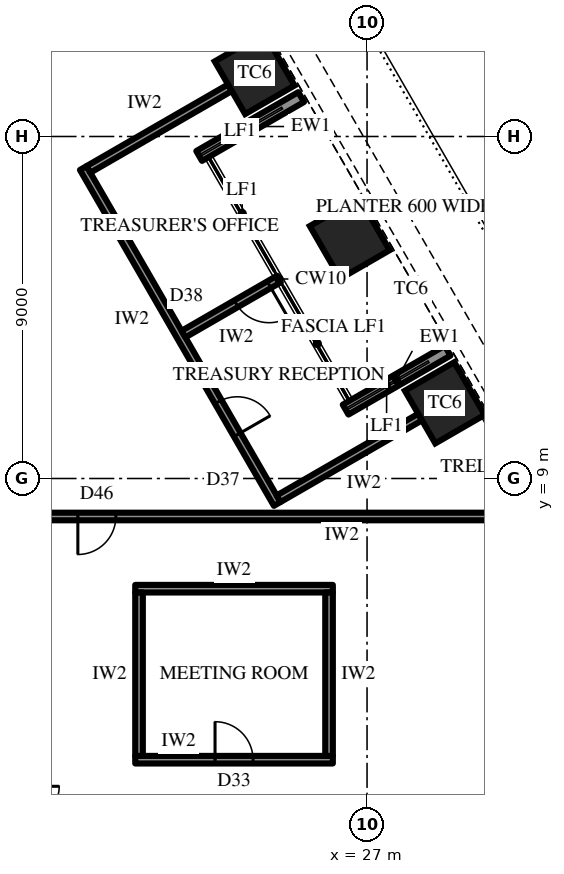
"""IFC4 building model, lengths in metres.
Left out: names, types, materials, properties, quantities, classifications, styles, units other than length and angle.
Written with IfcOpenShell. Run it as: python <this file> out.ifc"""

import sys

from ifc_helpers import new_model, si_unit, direction, frame, frame_2d, origin, origin_2d, place, context, subcontext, project, spatial, rectangle, extrude, element, fill, save


model = new_model("IFC4")
c1 = context("Model", 3, precision=1e-05, world=origin(), true_north=direction((0.0, 1.0)))
c2 = subcontext(c1, "Body", "Model", "MODEL_VIEW")
j1 = project(units=[si_unit("LENGTHUNIT", "METRE"), si_unit("PLANEANGLEUNIT", "RADIAN")], contexts=[c1])
p1 = place(None, origin())
s1 = spatial("IfcSite", under=j1, at=p1, CompositionType="ELEMENT")
p2 = place(p1, origin())
s2 = spatial("IfcBuilding", under=s1, at=p2, CompositionType="ELEMENT")
p3 = place(p2, frame((0.0, 0.0, 144.7)))
s3 = spatial("IfcBuildingStorey", under=s2, at=p3, CompositionType="ELEMENT", Elevation=144.7)
for number, where, z_axis, x_axis in (
    (1, (29.045, 10.992, 0.0), (0.0, 0.0, 1.0), (-0.5, 0.866, 0.0)),
    (2, (26.544, 15.325, 0.0), (0.0, 0.0, 1.0), (-0.5, 0.866, 0.0)),
    (3, (24.042, 19.658, 0.0), (0.0, 0.0, 1.0), (-0.5, 0.866, 0.0)),
):
    element("IfcColumn", number, at=place(p3, frame(where, z_axis=z_axis, x_axis=x_axis)), inside=s3, PredefinedType="COLUMN", context=c2, shape_type="SweptSolid", body=[
        extrude(rectangle(XDim=1.6, YDim=1.5, at=origin_2d()), origin(), (0.0, 0.0, 1.0), 4.2),
    ])
p4 = place(p3, frame((29.12, 12.363, 0.0), z_axis=(0.0, 0.0, 1.0), x_axis=(-0.86602952684, -0.49999285859, 0.0)))
e4 = element("IfcWall", 4, at=p4, inside=s3, PredefinedType="SOLIDWALL", context=c2, shape_type="SweptSolid", body=[
    extrude(rectangle(XDim=3.1, YDim=0.3, at=frame_2d((1.55, 0.0))), origin(), (0.0, 0.0, 1.0), 2.75),
])
p5 = place(p3, frame((25.266, 19.037, 0.0), z_axis=(0.0, 0.0, 1.0), x_axis=(-0.86600983753, -0.500026960575, 0.0)))
e5 = element("IfcWall", 5, at=p5, inside=s3, PredefinedType="SOLIDWALL", context=c2, shape_type="SweptSolid", body=[
    extrude(rectangle(XDim=3.1, YDim=0.3, at=frame_2d((1.55, 0.0))), origin(), (0.0, 0.0, 1.0), 2.75),
])
p6 = place(p3, frame((24.635, 8.33, 0.0), z_axis=(0.0, 0.0, 1.0), x_axis=(-0.500005407604, 0.86602228168, 0.0)))
e6 = element("IfcWall", 6, at=p6, inside=s3, PredefinedType="PARTITIONING", context=c2, shape_type="SweptSolid", body=[
    extrude(rectangle(XDim=10.208, YDim=0.2, at=frame_2d((5.104, 0.0))), origin(), (0.0, 0.0, 1.0), 4.0),
])
p7 = place(p6, frame((2.102, 0.0, 0.0)))
e7 = element("IfcOpeningElement", 7, at=p7, cuts=e6, PredefinedType="OPENING", context=c2, shape_type="SweptSolid", body=[
    extrude(rectangle(XDim=1.0, YDim=2.2, at=frame_2d((0.5, 1.1))), frame((0.0, 0.11, 0.0), z_axis=(0.0, -1.0, 0.0), x_axis=(1.0, 0.0, 0.0)), (0.0, 0.0, 1.0), 0.22),
])
p8 = place(p3, frame((24.672, 8.467, 0.0), z_axis=(0.0, 0.0, 1.0), x_axis=(0.866008775485, 0.500028799954, 0.0)))
e8 = element("IfcWall", 8, at=p8, inside=s3, PredefinedType="PARTITIONING", context=c2, shape_type="SweptSolid", body=[
    extrude(rectangle(XDim=4.3, YDim=0.2, at=frame_2d((2.15, 0.0))), origin(), (0.0, 0.0, 1.0), 3.082),
])
p9 = place(p3, frame((22.17, 12.8, 0.0), z_axis=(0.0, 0.0, 1.0), x_axis=(0.866044046824, 0.499967707918, 0.0)))
e9 = element("IfcWall", 9, at=p9, inside=s3, PredefinedType="PARTITIONING", context=c2, shape_type="SweptSolid", body=[
    extrude(rectangle(XDim=2.901, YDim=0.2, at=frame_2d((1.451, 0.0))), origin(), (0.0, 0.0, 1.0), 4.0),
])
p10 = place(p9, frame((1.6, 0.0, 0.0)))
e10 = element("IfcOpeningElement", 10, at=p10, cuts=e9, PredefinedType="OPENING", context=c2, shape_type="SweptSolid", body=[
    extrude(rectangle(XDim=1.0, YDim=2.2, at=frame_2d((0.5, 1.1))), frame((0.0, 0.11, 0.0), z_axis=(0.0, -1.0, 0.0), x_axis=(1.0, 0.0, 0.0)), (0.0, 0.0, 1.0), 0.22),
])
p11 = place(p3, frame((19.668, 17.133, 0.0), z_axis=(0.0, 0.0, 1.0), x_axis=(0.866008775485, 0.500028799954, 0.0)))
e11 = element("IfcWall", 11, at=p11, inside=s3, PredefinedType="PARTITIONING", context=c2, shape_type="SweptSolid", body=[
    extrude(rectangle(XDim=4.3, YDim=0.2, at=frame_2d((2.15, 0.0))), origin(), (0.0, 0.0, 1.0), 3.082),
])
p12 = place(p3, frame((20.9, 1.6, 0.0), z_axis=(0.0, 0.0, 1.0), x_axis=(1.0, 0.0, 0.0)))
e12 = element("IfcWall", 12, at=p12, inside=s3, PredefinedType="PARTITIONING", context=c2, shape_type="SweptSolid", body=[
    extrude(rectangle(XDim=5.2, YDim=0.2, at=frame_2d((2.6, 0.0))), origin(), (0.0, 0.0, 1.0), 4.0),
])
p13 = place(p12, frame((2.1, 0.0, 0.0)))
e13 = element("IfcOpeningElement", 13, at=p13, cuts=e12, PredefinedType="OPENING", context=c2, shape_type="SweptSolid", body=[
    extrude(rectangle(XDim=1.0, YDim=2.2, at=frame_2d((0.5, 1.1))), frame((0.0, 0.11, 0.0), z_axis=(0.0, -1.0, 0.0), x_axis=(1.0, 0.0, 0.0)), (0.0, 0.0, 1.0), 0.22),
])
p14 = place(p3, frame((20.9, 6.1, 0.0), z_axis=(0.0, 0.0, 1.0), x_axis=(1.0, 0.0, 0.0)))
e14 = element("IfcWall", 14, at=p14, inside=s3, PredefinedType="PARTITIONING", context=c2, shape_type="SweptSolid", body=[
    extrude(rectangle(XDim=5.2, YDim=0.2, at=frame_2d((2.6, 0.0))), origin(), (0.0, 0.0, 1.0), 4.0),
])
for number, where, z_axis, x_axis in (
    (15, (21.0, 1.7, 0.0), (0.0, 0.0, 1.0), (0.0, 1.0, 0.0)),
    (16, (26.0, 1.7, 0.0), (0.0, 0.0, 1.0), (0.0, 1.0, 0.0)),
):
    element("IfcWall", number, at=place(p3, frame(where, z_axis=z_axis, x_axis=x_axis)), inside=s3, PredefinedType="PARTITIONING", context=c2, shape_type="SweptSolid", body=[
        extrude(rectangle(XDim=4.3, YDim=0.2, at=frame_2d((2.15, 0.0))), origin(), (0.0, 0.0, 1.0), 4.0),
    ])
p15 = place(p3, frame((18.6, 8.0, 0.0), z_axis=(0.0, 0.0, 1.0), x_axis=(1.0, 0.0, 0.0)))
e17 = element("IfcWall", 17, at=p15, inside=s3, PredefinedType="PARTITIONING", context=c2, shape_type="SweptSolid", body=[
    extrude(rectangle(XDim=12.9, YDim=0.2, at=frame_2d((6.45, 0.0))), origin(), (0.0, 0.0, 1.0), 4.0),
])
p16 = place(p15, frame((0.79, 0.0, 0.0)))
e18 = element("IfcOpeningElement", 18, at=p16, cuts=e17, PredefinedType="OPENING", context=c2, shape_type="SweptSolid", body=[
    extrude(rectangle(XDim=1.0, YDim=2.2, at=frame_2d((0.5, 1.1))), frame((0.0, 0.11, 0.0), z_axis=(0.0, -1.0, 0.0), x_axis=(1.0, 0.0, 0.0)), (0.0, 0.0, 1.0), 0.22),
])
p17 = place(p7, frame((1.0, 0.0, 0.0), z_axis=(0.0, 0.0, 1.0), x_axis=(-1.0, 0.0, 0.0)))
e19 = element("IfcDoor", 19, at=p17, inside=s3, OperationType="SINGLE_SWING_LEFT", PredefinedType="DOOR", context=c2, shape_type="SweptSolid", body=[
    extrude(rectangle(XDim=1.0, YDim=2.2, at=frame_2d((0.5, 1.1))), frame((0.0, 0.025, 0.0), z_axis=(0.0, -1.0, 0.0), x_axis=(1.0, 0.0, 0.0)), (0.0, 0.0, 1.0), 0.05),
])
fill(e7, e19)
p18 = place(p10, frame((1.0, 0.0, 0.0), z_axis=(0.0, 0.0, 1.0), x_axis=(-1.0, 0.0, 0.0)))
e20 = element("IfcDoor", 20, at=p18, inside=s3, OperationType="SINGLE_SWING_RIGHT", PredefinedType="DOOR", context=c2, shape_type="SweptSolid", body=[
    extrude(rectangle(XDim=1.0, YDim=2.2, at=frame_2d((0.5, 1.1))), frame((0.0, 0.025, 0.0), z_axis=(0.0, -1.0, 0.0), x_axis=(1.0, 0.0, 0.0)), (0.0, 0.0, 1.0), 0.05),
])
fill(e10, e20)
p19 = place(p13, origin())
e21 = element("IfcDoor", 21, at=p19, inside=s3, OperationType="SINGLE_SWING_RIGHT", PredefinedType="DOOR", context=c2, shape_type="SweptSolid", body=[
    extrude(rectangle(XDim=1.0, YDim=2.2, at=frame_2d((0.5, 1.1))), frame((0.0, 0.025, 0.0), z_axis=(0.0, -1.0, 0.0), x_axis=(1.0, 0.0, 0.0)), (0.0, 0.0, 1.0), 0.05),
])
fill(e13, e21)
p20 = place(p16, frame((1.0, 0.0, 0.0), z_axis=(0.0, 0.0, 1.0), x_axis=(-1.0, 0.0, 0.0)))
e22 = element("IfcDoor", 22, at=p20, inside=s3, OperationType="SINGLE_SWING_LEFT", PredefinedType="DOOR", context=c2, shape_type="SweptSolid", body=[
    extrude(rectangle(XDim=1.0, YDim=2.2, at=frame_2d((0.5, 1.1))), frame((0.0, 0.025, 0.0), z_axis=(0.0, -1.0, 0.0), x_axis=(1.0, 0.0, 0.0)), (0.0, 0.0, 1.0), 0.05),
])
fill(e18, e22)
save(model, sys.argv[1])
